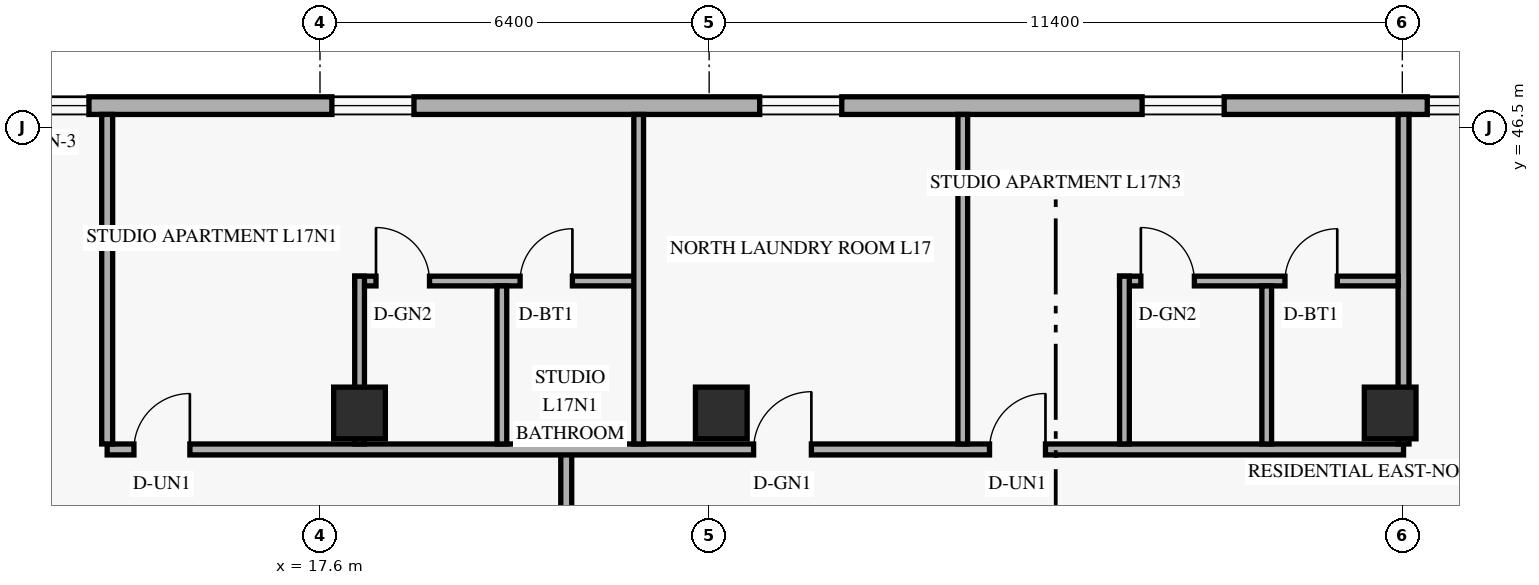
"""IFC4 building model, lengths in metres.
Left out: names, types, materials, properties, quantities, classifications, styles, units other than length and angle.
Written with IfcOpenShell. Run it as: python <this file> out.ifc"""

import sys

from ifc_helpers import new_model, si_unit, direction, frame, frame_2d, origin, origin_2d, place, context, subcontext, project, spatial, rectangle, extrude, element, fill, save


model = new_model("IFC4")
c1 = context("Model", 3, precision=1e-05, world=origin(), true_north=direction((0.0, 1.0)))
c2 = subcontext(c1, "Body", "Model", "MODEL_VIEW")
j1 = project(units=[si_unit("LENGTHUNIT", "METRE"), si_unit("PLANEANGLEUNIT", "RADIAN")], contexts=[c1])
p1 = place(None, origin())
s1 = spatial("IfcSite", under=j1, at=p1, CompositionType="ELEMENT")
p2 = place(p1, origin())
s2 = spatial("IfcBuilding", under=s1, at=p2, CompositionType="ELEMENT")
p3 = place(p2, frame((0.0, 0.0, 67.8)))
s3 = spatial("IfcBuildingStorey", under=s2, at=p3, CompositionType="ELEMENT", Elevation=67.8)
for number, where, z_axis, x_axis in (
    (1, (18.25, 41.8, 0.0), (0.0, 0.0, 1.0), (1.0, 0.0, 0.0)),
    (2, (24.2, 41.8, 0.0), (0.0, 0.0, 1.0), (1.0, 0.0, 0.0)),
    (3, (35.2, 41.8, 0.0), (0.0, 0.0, 1.0), (1.0, 0.0, 0.0)),
):
    element("IfcColumn", number, at=place(p3, frame(where, z_axis=z_axis, x_axis=x_axis)), inside=s3, PredefinedType="COLUMN", context=c2, shape_type="SweptSolid", body=[
        extrude(rectangle(XDim=0.85, YDim=0.85, at=origin_2d()), origin(), (0.0, 0.0, 1.0), 3.6),
    ])
p4 = place(p3, frame((44.98, 46.855, 0.0), z_axis=(0.0, 0.0, 1.0), x_axis=(-1.0, 0.0, 0.0)))
e4 = element("IfcWall", 4, at=p4, inside=s3, PredefinedType="SOLIDWALL", context=c2, shape_type="SweptSolid", body=[
    extrude(rectangle(XDim=39.56, YDim=0.29, at=frame_2d((19.78, 0.0))), origin(), (0.0, 0.0, 1.0), 3.3),
])
p5 = place(p4, frame((35.445, 0.0, 0.85)))
e5 = element("IfcOpeningElement", 5, at=p5, cuts=e4, PredefinedType="OPENING", context=c2, shape_type="SweptSolid", body=[
    extrude(rectangle(XDim=1.35, YDim=1.55, at=frame_2d((0.675, 0.775))), frame((0.0, 0.155, 0.0), z_axis=(0.0, -1.0, 0.0), x_axis=(1.0, 0.0, 0.0)), (0.0, 0.0, 1.0), 0.31),
])
p6 = place(p4, frame((31.18, 0.0, 0.85)))
e6 = element("IfcOpeningElement", 6, at=p6, cuts=e4, PredefinedType="OPENING", context=c2, shape_type="SweptSolid", body=[
    extrude(rectangle(XDim=1.2, YDim=1.5, at=frame_2d((0.6, 0.75))), frame((0.0, 0.155, 0.0), z_axis=(0.0, -1.0, 0.0), x_axis=(1.0, 0.0, 0.0)), (0.0, 0.0, 1.0), 0.31),
])
p7 = place(p4, frame((25.834, 0.0, 0.85)))
e7 = element("IfcOpeningElement", 7, at=p7, cuts=e4, PredefinedType="OPENING", context=c2, shape_type="SweptSolid", body=[
    extrude(rectangle(XDim=1.35, YDim=1.55, at=frame_2d((0.675, 0.775))), frame((0.0, 0.155, 0.0), z_axis=(0.0, -1.0, 0.0), x_axis=(1.0, 0.0, 0.0)), (0.0, 0.0, 1.0), 0.31),
])
p8 = place(p4, frame((18.799, 0.0, 0.85)))
e8 = element("IfcOpeningElement", 8, at=p8, cuts=e4, PredefinedType="OPENING", context=c2, shape_type="SweptSolid", body=[
    extrude(rectangle(XDim=1.35, YDim=1.55, at=frame_2d((0.675, 0.775))), frame((0.0, 0.155, 0.0), z_axis=(0.0, -1.0, 0.0), x_axis=(1.0, 0.0, 0.0)), (0.0, 0.0, 1.0), 0.31),
])
p9 = place(p4, frame((12.51, 0.0, 0.85)))
e9 = element("IfcOpeningElement", 9, at=p9, cuts=e4, PredefinedType="OPENING", context=c2, shape_type="SweptSolid", body=[
    extrude(rectangle(XDim=1.35, YDim=1.55, at=frame_2d((0.675, 0.775))), frame((0.0, 0.155, 0.0), z_axis=(0.0, -1.0, 0.0), x_axis=(1.0, 0.0, 0.0)), (0.0, 0.0, 1.0), 0.31),
])
p10 = place(p4, frame((7.82, 0.0, 0.85)))
e10 = element("IfcOpeningElement", 10, at=p10, cuts=e4, PredefinedType="OPENING", context=c2, shape_type="SweptSolid", body=[
    extrude(rectangle(XDim=1.35, YDim=1.55, at=frame_2d((0.675, 0.775))), frame((0.0, 0.155, 0.0), z_axis=(0.0, -1.0, 0.0), x_axis=(1.0, 0.0, 0.0)), (0.0, 0.0, 1.0), 0.31),
])
p11 = place(p4, frame((3.04, 0.0, 0.85)))
e11 = element("IfcOpeningElement", 11, at=p11, cuts=e4, PredefinedType="OPENING", context=c2, shape_type="SweptSolid", body=[
    extrude(rectangle(XDim=1.35, YDim=1.55, at=frame_2d((0.675, 0.775))), frame((0.0, 0.155, 0.0), z_axis=(0.0, -1.0, 0.0), x_axis=(1.0, 0.0, 0.0)), (0.0, 0.0, 1.0), 0.31),
])
p12 = place(p3, frame((21.65, 6.8, 0.0), z_axis=(0.0, 0.0, 1.0), x_axis=(0.0, 1.0, 0.0)))
e12 = element("IfcWall", 12, at=p12, inside=s3, PredefinedType="STANDARD", context=c2, shape_type="SweptSolid", body=[
    extrude(rectangle(XDim=34.4, YDim=0.18, at=frame_2d((17.2, 0.0))), origin(), (0.0, 0.0, 1.0), 2.589),
])
p13 = place(p3, frame((14.1, 41.2, 0.0), z_axis=(0.0, 0.0, 1.0), x_axis=(1.0, 0.0, 0.0)))
e13 = element("IfcWall", 13, at=p13, inside=s3, PredefinedType="STANDARD", context=c2, shape_type="SweptSolid", body=[
    extrude(rectangle(XDim=21.32, YDim=0.18, at=frame_2d((10.66, 0.0))), origin(), (0.0, 0.0, 1.0), 2.589),
])
p14 = place(p13, frame((0.44, 0.0, 0.0)))
e14 = element("IfcOpeningElement", 14, at=p14, cuts=e13, PredefinedType="OPENING", context=c2, shape_type="SweptSolid", body=[
    extrude(rectangle(XDim=0.92, YDim=2.15, at=frame_2d((0.46, 1.075))), frame((0.0, 0.1, 0.0), z_axis=(0.0, -1.0, 0.0), x_axis=(1.0, 0.0, 0.0)), (0.0, 0.0, 1.0), 0.2),
])
p15 = place(p13, frame((10.631, 0.0, 0.0)))
e15 = element("IfcOpeningElement", 15, at=p15, cuts=e13, PredefinedType="OPENING", context=c2, shape_type="SweptSolid", body=[
    extrude(rectangle(XDim=0.95, YDim=2.15, at=frame_2d((0.475, 1.075))), frame((0.0, 0.1, 0.0), z_axis=(0.0, -1.0, 0.0), x_axis=(1.0, 0.0, 0.0)), (0.0, 0.0, 1.0), 0.2),
])
p16 = place(p13, frame((14.511, 0.0, 0.0)))
e16 = element("IfcOpeningElement", 16, at=p16, cuts=e13, PredefinedType="OPENING", context=c2, shape_type="SweptSolid", body=[
    extrude(rectangle(XDim=0.92, YDim=2.15, at=frame_2d((0.46, 1.075))), frame((0.0, 0.1, 0.0), z_axis=(0.0, -1.0, 0.0), x_axis=(1.0, 0.0, 0.0)), (0.0, 0.0, 1.0), 0.2),
])
p17 = place(p3, frame((35.42, 41.29, 0.0), z_axis=(0.0, 0.0, 1.0), x_axis=(0.0, 1.0, 0.0)))
e17 = element("IfcWall", 17, at=p17, inside=s3, PredefinedType="PARTITIONING", context=c2, shape_type="SweptSolid", body=[
    extrude(rectangle(XDim=5.42, YDim=0.18, at=frame_2d((2.71, 0.0))), origin(), (0.0, 0.0, 1.0), 3.3),
])
p18 = place(p3, frame((14.1, 41.29, 0.0), z_axis=(0.0, 0.0, 1.0), x_axis=(0.0, 1.0, 0.0)))
e18 = element("IfcWall", 18, at=p18, inside=s3, PredefinedType="PARTITIONING", context=c2, shape_type="SweptSolid", body=[
    extrude(rectangle(XDim=5.42, YDim=0.18, at=frame_2d((2.71, 0.0))), origin(), (0.0, 0.0, 1.0), 2.749),
])
p19 = place(p3, frame((18.171, 43.97, 0.0), z_axis=(0.0, 0.0, 1.0), x_axis=(1.0, 0.0, 0.0)))
e19 = element("IfcWall", 19, at=p19, inside=s3, PredefinedType="PLUMBINGWALL", context=c2, shape_type="SweptSolid", body=[
    extrude(rectangle(XDim=4.67, YDim=0.16, at=frame_2d((2.335, 0.0))), origin(), (0.0, 0.0, 1.0), 3.3),
])
p20 = place(p19, frame((0.35, 0.0, 0.0)))
e20 = element("IfcOpeningElement", 20, at=p20, cuts=e19, PredefinedType="OPENING", context=c2, shape_type="SweptSolid", body=[
    extrude(rectangle(XDim=0.88, YDim=2.12, at=frame_2d((0.44, 1.06))), frame((0.0, 0.09, 0.0), z_axis=(0.0, -1.0, 0.0), x_axis=(1.0, 0.0, 0.0)), (0.0, 0.0, 1.0), 0.18),
])
p21 = place(p19, frame((2.72, 0.0, 0.0)))
e21 = element("IfcOpeningElement", 21, at=p21, cuts=e19, PredefinedType="OPENING", context=c2, shape_type="SweptSolid", body=[
    extrude(rectangle(XDim=0.86, YDim=2.12, at=frame_2d((0.43, 1.06))), frame((0.0, 0.09, 0.0), z_axis=(0.0, -1.0, 0.0), x_axis=(1.0, 0.0, 0.0)), (0.0, 0.0, 1.0), 0.18),
])
p22 = place(p3, frame((18.251, 41.29, 0.0), z_axis=(0.0, 0.0, 1.0), x_axis=(0.0, 1.0, 0.0)))
e22 = element("IfcWall", 22, at=p22, inside=s3, PredefinedType="PLUMBINGWALL", context=c2, shape_type="SweptSolid", body=[
    extrude(rectangle(XDim=2.76, YDim=0.16, at=frame_2d((1.38, 0.0))), origin(), (0.0, 0.0, 1.0), 2.589),
])
p23 = place(p3, frame((20.591, 41.29, 0.0), z_axis=(0.0, 0.0, 1.0), x_axis=(0.0, 1.0, 0.0)))
e23 = element("IfcWall", 23, at=p23, inside=s3, PredefinedType="PLUMBINGWALL", context=c2, shape_type="SweptSolid", body=[
    extrude(rectangle(XDim=2.6, YDim=0.16, at=frame_2d((1.3, 0.0))), origin(), (0.0, 0.0, 1.0), 2.749),
])
for number, where, z_axis, x_axis in (
    (24, (22.841, 41.29, 0.0), (0.0, 0.0, 1.0), (0.0, 1.0, 0.0)),
    (25, (28.171, 41.29, 0.0), (0.0, 0.0, 1.0), (0.0, 1.0, 0.0)),
):
    element("IfcWall", number, at=place(p3, frame(where, z_axis=z_axis, x_axis=x_axis)), inside=s3, PredefinedType="PARTITIONING", context=c2, shape_type="SweptSolid", body=[
        extrude(rectangle(XDim=5.42, YDim=0.16, at=frame_2d((2.71, 0.0))), origin(), (0.0, 0.0, 1.0), 2.749),
    ])
p24 = place(p3, frame((30.75, 43.97, 0.0), z_axis=(0.0, 0.0, 1.0), x_axis=(1.0, 0.0, 0.0)))
e26 = element("IfcWall", 26, at=p24, inside=s3, PredefinedType="PLUMBINGWALL", context=c2, shape_type="SweptSolid", body=[
    extrude(rectangle(XDim=4.58, YDim=0.16, at=frame_2d((2.29, 0.0))), origin(), (0.0, 0.0, 1.0), 3.3),
])
p25 = place(p24, frame((0.35, 0.0, 0.0)))
e27 = element("IfcOpeningElement", 27, at=p25, cuts=e26, PredefinedType="OPENING", context=c2, shape_type="SweptSolid", body=[
    extrude(rectangle(XDim=0.88, YDim=2.12, at=frame_2d((0.44, 1.06))), frame((0.0, 0.09, 0.0), z_axis=(0.0, -1.0, 0.0), x_axis=(1.0, 0.0, 0.0)), (0.0, 0.0, 1.0), 0.18),
])
p26 = place(p24, frame((2.72, 0.0, 0.0)))
e28 = element("IfcOpeningElement", 28, at=p26, cuts=e26, PredefinedType="OPENING", context=c2, shape_type="SweptSolid", body=[
    extrude(rectangle(XDim=0.86, YDim=2.12, at=frame_2d((0.43, 1.06))), frame((0.0, 0.09, 0.0), z_axis=(0.0, -1.0, 0.0), x_axis=(1.0, 0.0, 0.0)), (0.0, 0.0, 1.0), 0.18),
])
p27 = place(p3, frame((30.83, 41.29, 0.0), z_axis=(0.0, 0.0, 1.0), x_axis=(0.0, 1.0, 0.0)))
e29 = element("IfcWall", 29, at=p27, inside=s3, PredefinedType="PLUMBINGWALL", context=c2, shape_type="SweptSolid", body=[
    extrude(rectangle(XDim=2.76, YDim=0.16, at=frame_2d((1.38, 0.0))), origin(), (0.0, 0.0, 1.0), 2.749),
])
p28 = place(p3, frame((33.17, 41.29, 0.0), z_axis=(0.0, 0.0, 1.0), x_axis=(0.0, 1.0, 0.0)))
e30 = element("IfcWall", 30, at=p28, inside=s3, PredefinedType="PLUMBINGWALL", context=c2, shape_type="SweptSolid", body=[
    extrude(rectangle(XDim=2.6, YDim=0.16, at=frame_2d((1.3, 0.0))), origin(), (0.0, 0.0, 1.0), 2.749),
])
p29 = place(p6, origin())
e31 = element("IfcWindow", 31, at=p29, inside=s3, PartitioningType="SINGLE_PANEL", PredefinedType="WINDOW", context=c2, shape_type="SweptSolid", body=[
    extrude(rectangle(XDim=1.2, YDim=1.5, at=frame_2d((0.6, 0.75))), frame((0.0, 0.03, 0.0), z_axis=(0.0, -1.0, 0.0), x_axis=(1.0, 0.0, 0.0)), (0.0, 0.0, 1.0), 0.06),
])
fill(e6, e31)
p30 = place(p7, origin())
e32 = element("IfcWindow", 32, at=p30, inside=s3, PartitioningType="SINGLE_PANEL", PredefinedType="WINDOW", context=c2, shape_type="SweptSolid", body=[
    extrude(rectangle(XDim=1.35, YDim=1.55, at=frame_2d((0.675, 0.775))), frame((0.0, 0.03, 0.0), z_axis=(0.0, -1.0, 0.0), x_axis=(1.0, 0.0, 0.0)), (0.0, 0.0, 1.0), 0.06),
])
fill(e7, e32)
p31 = place(p8, origin())
e33 = element("IfcWindow", 33, at=p31, inside=s3, PartitioningType="SINGLE_PANEL", PredefinedType="WINDOW", context=c2, shape_type="SweptSolid", body=[
    extrude(rectangle(XDim=1.35, YDim=1.55, at=frame_2d((0.675, 0.775))), frame((0.0, 0.03, 0.0), z_axis=(0.0, -1.0, 0.0), x_axis=(1.0, 0.0, 0.0)), (0.0, 0.0, 1.0), 0.06),
])
fill(e8, e33)
p32 = place(p9, origin())
e34 = element("IfcWindow", 34, at=p32, inside=s3, PartitioningType="SINGLE_PANEL", PredefinedType="WINDOW", context=c2, shape_type="SweptSolid", body=[
    extrude(rectangle(XDim=1.35, YDim=1.55, at=frame_2d((0.675, 0.775))), frame((0.0, 0.03, 0.0), z_axis=(0.0, -1.0, 0.0), x_axis=(1.0, 0.0, 0.0)), (0.0, 0.0, 1.0), 0.06),
])
fill(e9, e34)
p33 = place(p10, origin())
e35 = element("IfcWindow", 35, at=p33, inside=s3, PartitioningType="SINGLE_PANEL", PredefinedType="WINDOW", context=c2, shape_type="SweptSolid", body=[
    extrude(rectangle(XDim=1.35, YDim=1.55, at=frame_2d((0.675, 0.775))), frame((0.0, 0.03, 0.0), z_axis=(0.0, -1.0, 0.0), x_axis=(1.0, 0.0, 0.0)), (0.0, 0.0, 1.0), 0.06),
])
fill(e10, e35)
p34 = place(p14, origin())
e36 = element("IfcDoor", 36, at=p34, inside=s3, OperationType="SINGLE_SWING_RIGHT", PredefinedType="DOOR", context=c2, shape_type="SweptSolid", body=[
    extrude(rectangle(XDim=0.92, YDim=2.15, at=frame_2d((0.46, 1.075))), frame((0.0, 0.025, 0.0), z_axis=(0.0, -1.0, 0.0), x_axis=(1.0, 0.0, 0.0)), (0.0, 0.0, 1.0), 0.05),
])
fill(e14, e36)
p35 = place(p20, origin())
e37 = element("IfcDoor", 37, at=p35, inside=s3, OperationType="SINGLE_SWING_LEFT", PredefinedType="DOOR", context=c2, shape_type="SweptSolid", body=[
    extrude(rectangle(XDim=0.88, YDim=2.12, at=frame_2d((0.44, 1.06))), frame((0.0, 0.025, 0.0), z_axis=(0.0, -1.0, 0.0), x_axis=(1.0, 0.0, 0.0)), (0.0, 0.0, 1.0), 0.05),
])
fill(e20, e37)
p36 = place(p21, origin())
e38 = element("IfcDoor", 38, at=p36, inside=s3, OperationType="SINGLE_SWING_RIGHT", PredefinedType="DOOR", context=c2, shape_type="SweptSolid", body=[
    extrude(rectangle(XDim=0.86, YDim=2.12, at=frame_2d((0.43, 1.06))), frame((0.0, 0.025, 0.0), z_axis=(0.0, -1.0, 0.0), x_axis=(1.0, 0.0, 0.0)), (0.0, 0.0, 1.0), 0.05),
])
fill(e21, e38)
p37 = place(p15, origin())
e39 = element("IfcDoor", 39, at=p37, inside=s3, OperationType="SINGLE_SWING_RIGHT", PredefinedType="DOOR", context=c2, shape_type="SweptSolid", body=[
    extrude(rectangle(XDim=0.95, YDim=2.15, at=frame_2d((0.475, 1.075))), frame((0.0, 0.025, 0.0), z_axis=(0.0, -1.0, 0.0), x_axis=(1.0, 0.0, 0.0)), (0.0, 0.0, 1.0), 0.05),
])
fill(e15, e39)
p38 = place(p16, origin())
e40 = element("IfcDoor", 40, at=p38, inside=s3, OperationType="SINGLE_SWING_RIGHT", PredefinedType="DOOR", context=c2, shape_type="SweptSolid", body=[
    extrude(rectangle(XDim=0.92, YDim=2.15, at=frame_2d((0.46, 1.075))), frame((0.0, 0.025, 0.0), z_axis=(0.0, -1.0, 0.0), x_axis=(1.0, 0.0, 0.0)), (0.0, 0.0, 1.0), 0.05),
])
fill(e16, e40)
p39 = place(p25, origin())
e41 = element("IfcDoor", 41, at=p39, inside=s3, OperationType="SINGLE_SWING_LEFT", PredefinedType="DOOR", context=c2, shape_type="SweptSolid", body=[
    extrude(rectangle(XDim=0.88, YDim=2.12, at=frame_2d((0.44, 1.06))), frame((0.0, 0.025, 0.0), z_axis=(0.0, -1.0, 0.0), x_axis=(1.0, 0.0, 0.0)), (0.0, 0.0, 1.0), 0.05),
])
fill(e27, e41)
p40 = place(p26, origin())
e42 = element("IfcDoor", 42, at=p40, inside=s3, OperationType="SINGLE_SWING_RIGHT", PredefinedType="DOOR", context=c2, shape_type="SweptSolid", body=[
    extrude(rectangle(XDim=0.86, YDim=2.12, at=frame_2d((0.43, 1.06))), frame((0.0, 0.025, 0.0), z_axis=(0.0, -1.0, 0.0), x_axis=(1.0, 0.0, 0.0)), (0.0, 0.0, 1.0), 0.05),
])
fill(e28, e42)
save(model, sys.argv[1])
